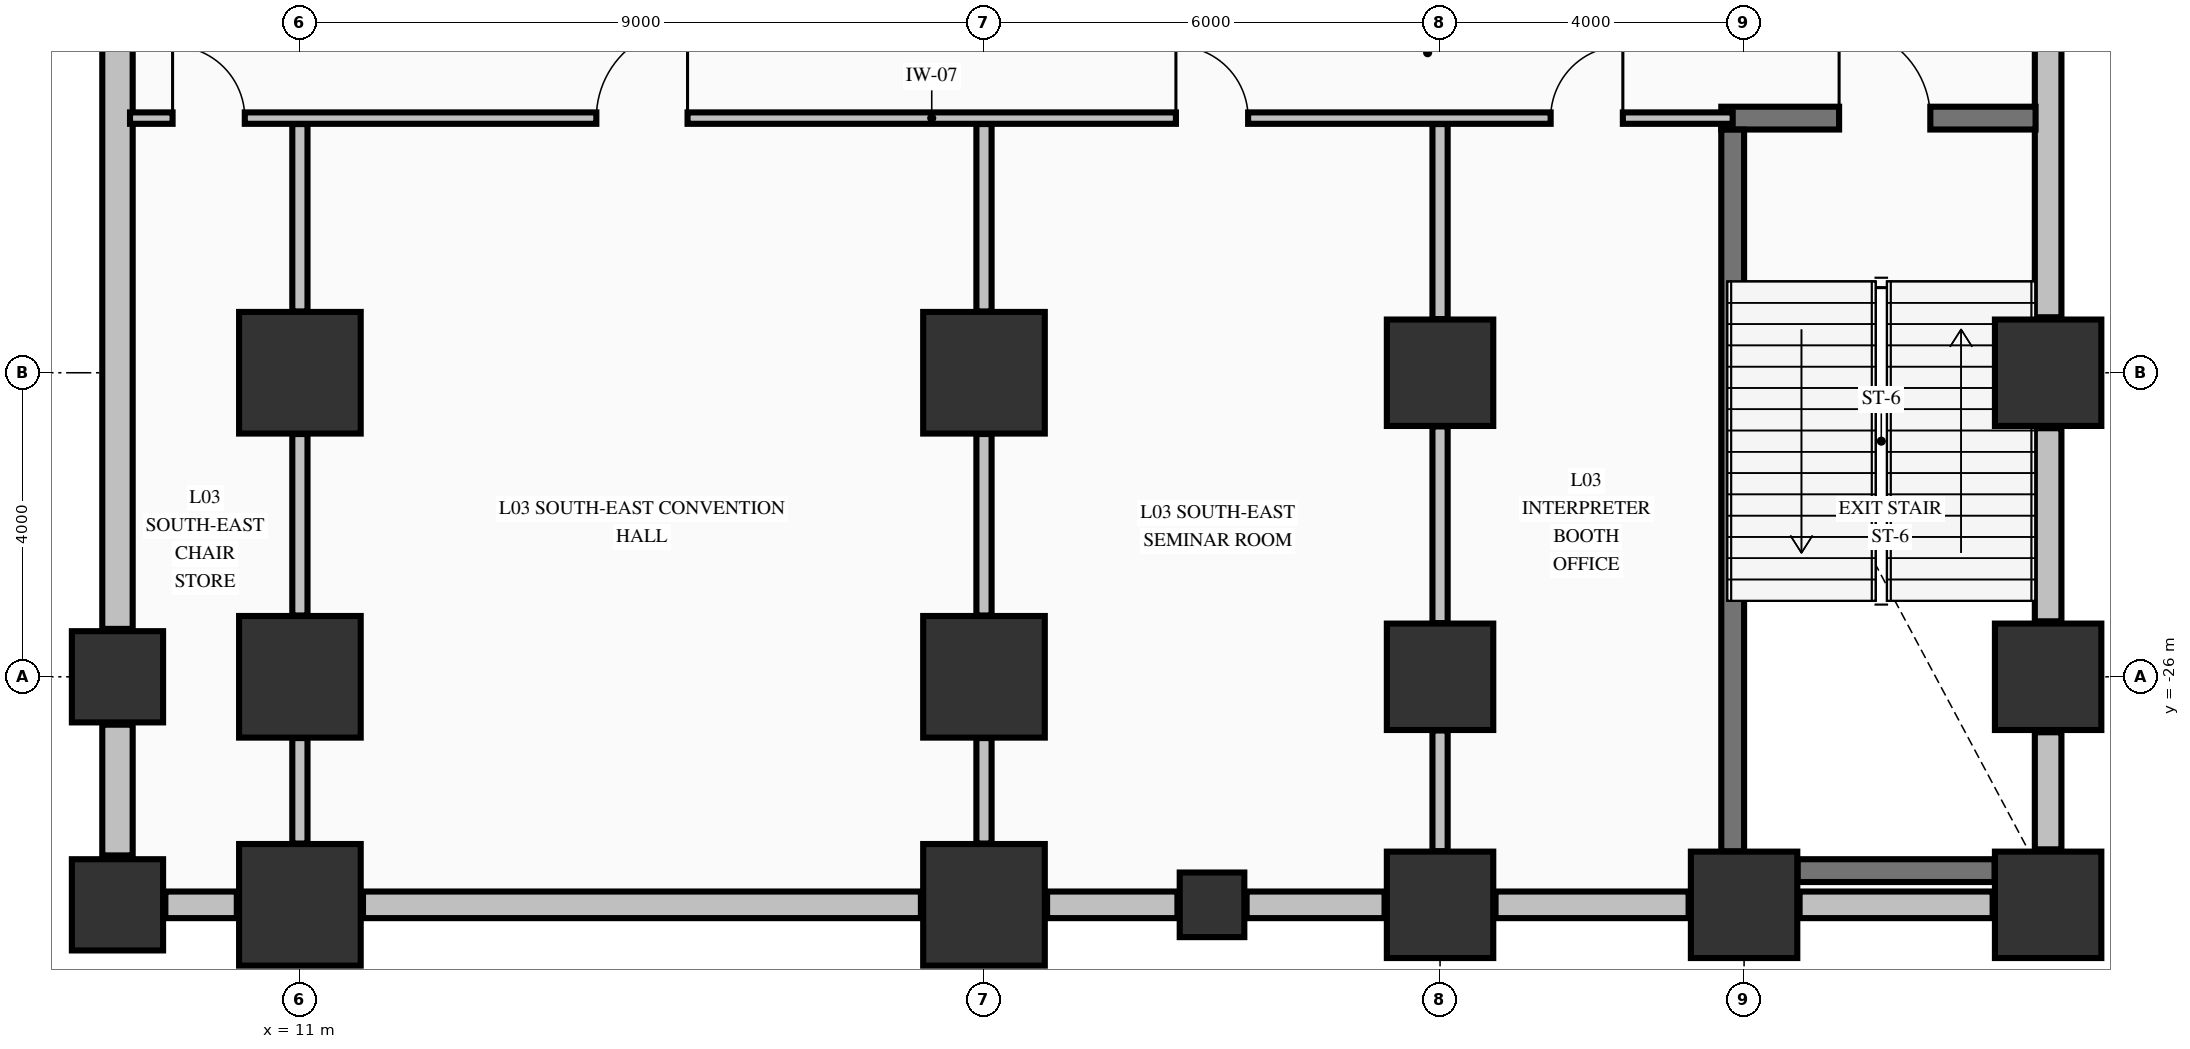
"""IFC4 building model, lengths in metres.
Left out: names, types, materials, properties, quantities, classifications, styles, units other than length and angle.
Written with IfcOpenShell. Run it as: python <this file> out.ifc"""

import sys

from ifc_helpers import new_model, si_unit, direction, frame, frame_2d, origin, origin_2d, place, context, subcontext, project, spatial, rectangle, extrude, element, fill, save


model = new_model("IFC4")
c1 = context("Model", 3, precision=1e-05, world=origin(), true_north=direction((0.0, 1.0)))
c2 = subcontext(c1, "Body", "Model", "MODEL_VIEW")
j1 = project(units=[si_unit("LENGTHUNIT", "METRE"), si_unit("PLANEANGLEUNIT", "RADIAN")], contexts=[c1])
p1 = place(None, origin())
s1 = spatial("IfcSite", under=j1, at=p1, CompositionType="ELEMENT")
p2 = place(p1, origin())
s2 = spatial("IfcBuilding", under=s1, at=p2, CompositionType="ELEMENT")
p3 = place(p2, frame((0.0, 0.0, 16.32)))
s3 = spatial("IfcBuildingStorey", under=s2, at=p3, CompositionType="ELEMENT", Elevation=16.32)
for number, where, z_axis, x_axis in (
    (1, (11.0, -29.0, 0.0), (0.0, 0.0, 1.0), (1.0, 0.0, 0.0)),
    (2, (11.0, -26.0, 0.0), (0.0, 0.0, 1.0), (1.0, 0.0, 0.0)),
    (3, (11.0, -22.0, 0.0), (0.0, 0.0, 1.0), (1.0, 0.0, 0.0)),
    (4, (20.0, -29.0, 0.0), (0.0, 0.0, 1.0), (1.0, 0.0, 0.0)),
    (5, (20.0, -26.0, 0.0), (0.0, 0.0, 1.0), (1.0, 0.0, 0.0)),
    (6, (20.0, -22.0, 0.0), (0.0, 0.0, 1.0), (1.0, 0.0, 0.0)),
):
    element("IfcColumn", number, at=place(p3, frame(where, z_axis=z_axis, x_axis=x_axis)), inside=s3, PredefinedType="COLUMN", context=c2, shape_type="SweptSolid", body=[
        extrude(rectangle(XDim=1.6, YDim=1.6, at=origin_2d()), origin(), (0.0, 0.0, 1.0), 4.99),
    ])
for number, where, z_axis, x_axis in (
    (7, (26.0, -29.0, 0.0), (0.0, 0.0, 1.0), (1.0, 0.0, 0.0)),
    (8, (26.0, -26.0, 0.0), (0.0, 0.0, 1.0), (1.0, 0.0, 0.0)),
    (9, (26.0, -22.0, 0.0), (0.0, 0.0, 1.0), (1.0, 0.0, 0.0)),
    (10, (30.0, -29.0, 0.0), (0.0, 0.0, 1.0), (1.0, 0.0, 0.0)),
    (11, (34.0, -29.0, 0.0), (0.0, 0.0, 1.0), (1.0, 0.0, 0.0)),
    (12, (34.0, -26.0, 0.0), (0.0, 0.0, 1.0), (1.0, 0.0, 0.0)),
    (13, (34.0, -22.0, 0.0), (0.0, 0.0, 1.0), (1.0, 0.0, 0.0)),
):
    element("IfcColumn", number, at=place(p3, frame(where, z_axis=z_axis, x_axis=x_axis)), inside=s3, PredefinedType="COLUMN", context=c2, shape_type="SweptSolid", body=[
        extrude(rectangle(XDim=1.4, YDim=1.4, at=origin_2d()), origin(), (0.0, 0.0, 1.0), 4.99),
    ])
for number, where, z_axis, x_axis in (
    (14, (8.6, -29.0, 0.0), (0.0, 0.0, 1.0), (1.0, 0.0, 0.0)),
    (15, (8.6, -26.0, 0.0), (0.0, 0.0, 1.0), (1.0, 0.0, 0.0)),
):
    element("IfcColumn", number, at=place(p3, frame(where, z_axis=z_axis, x_axis=x_axis)), inside=s3, PredefinedType="COLUMN", context=c2, shape_type="SweptSolid", body=[
        extrude(rectangle(XDim=1.2, YDim=1.2, at=origin_2d()), origin(), (0.0, 0.0, 1.0), 4.99),
    ])
p4 = place(p3, frame((23.0, -29.0, 0.0), z_axis=(0.0, 0.0, 1.0), x_axis=(1.0, 0.0, 0.0)))
e16 = element("IfcColumn", 16, at=p4, inside=s3, PredefinedType="PILASTER", context=c2, shape_type="SweptSolid", body=[
    extrude(rectangle(XDim=0.85, YDim=0.85, at=origin_2d()), origin(), (0.0, 0.0, 1.0), 4.99),
])
p5 = place(p3, frame((9.23, -29.0, 0.0), z_axis=(0.0, 0.0, 1.0), x_axis=(1.0, 0.0, 0.0)))
e17 = element("IfcWall", 17, at=p5, inside=s3, PredefinedType="STANDARD", context=c2, shape_type="SweptSolid", body=[
    extrude(rectangle(XDim=0.94, YDim=0.35, at=frame_2d((0.47, 0.0))), origin(), (0.0, 0.0, 1.0), 3.332),
])
p6 = place(p3, frame((11.83, -29.0, 0.0), z_axis=(0.0, 0.0, 1.0), x_axis=(1.0, 0.0, 0.0)))
e18 = element("IfcWall", 18, at=p6, inside=s3, PredefinedType="STANDARD", context=c2, shape_type="SweptSolid", body=[
    extrude(rectangle(XDim=7.34, YDim=0.35, at=frame_2d((3.67, 0.0))), origin(), (0.0, 0.0, 1.0), 3.332),
])
p7 = place(p3, frame((20.83, -29.0, 0.0), z_axis=(0.0, 0.0, 1.0), x_axis=(1.0, 0.0, 0.0)))
e19 = element("IfcWall", 19, at=p7, inside=s3, PredefinedType="STANDARD", context=c2, shape_type="SweptSolid", body=[
    extrude(rectangle(XDim=1.715, YDim=0.35, at=frame_2d((0.857, 0.0))), origin(), (0.0, 0.0, 1.0), 3.332),
])
p8 = place(p3, frame((23.455, -29.0, 0.0), z_axis=(0.0, 0.0, 1.0), x_axis=(1.0, 0.0, 0.0)))
e20 = element("IfcWall", 20, at=p8, inside=s3, PredefinedType="STANDARD", context=c2, shape_type="SweptSolid", body=[
    extrude(rectangle(XDim=1.815, YDim=0.35, at=frame_2d((0.907, 0.0))), origin(), (0.0, 0.0, 1.0), 3.332),
])
for number, where, z_axis, x_axis in (
    (21, (26.73, -29.0, 0.0), (0.0, 0.0, 1.0), (1.0, 0.0, 0.0)),
    (22, (30.73, -29.0, 0.0), (0.0, 0.0, 1.0), (1.0, 0.0, 0.0)),
):
    element("IfcWall", number, at=place(p3, frame(where, z_axis=z_axis, x_axis=x_axis)), inside=s3, PredefinedType="STANDARD", context=c2, shape_type="SweptSolid", body=[
        extrude(rectangle(XDim=2.54, YDim=0.35, at=frame_2d((1.27, 0.0))), origin(), (0.0, 0.0, 1.0), 3.332),
    ])
p9 = place(p3, frame((34.0, -26.73, 0.0), z_axis=(0.0, 0.0, 1.0), x_axis=(0.0, -1.0, 0.0)))
e23 = element("IfcWall", 23, at=p9, inside=s3, PredefinedType="STANDARD", context=c2, shape_type="SweptSolid", body=[
    extrude(rectangle(XDim=1.54, YDim=0.35, at=frame_2d((0.77, 0.0))), origin(), (0.0, 0.0, 1.0), 4.99),
])
p10 = place(p3, frame((34.0, -22.73, 0.0), z_axis=(0.0, 0.0, 1.0), x_axis=(0.0, -1.0, 0.0)))
e24 = element("IfcWall", 24, at=p10, inside=s3, PredefinedType="STANDARD", context=c2, shape_type="SweptSolid", body=[
    extrude(rectangle(XDim=2.54, YDim=0.35, at=frame_2d((1.27, 0.0))), origin(), (0.0, 0.0, 1.0), 4.99),
])
p11 = place(p3, frame((34.0, -16.73, 0.0), z_axis=(0.0, 0.0, 1.0), x_axis=(0.0, -1.0, 0.0)))
e25 = element("IfcWall", 25, at=p11, inside=s3, PredefinedType="STANDARD", context=c2, shape_type="SweptSolid", body=[
    extrude(rectangle(XDim=4.54, YDim=0.35, at=frame_2d((2.27, 0.0))), origin(), (0.0, 0.0, 1.0), 4.99),
])
p12 = place(p3, frame((8.6, -0.65, 0.0), z_axis=(0.0, 0.0, 1.0), x_axis=(0.0, -1.0, 0.0)))
e26 = element("IfcWall", 26, at=p12, inside=s3, PredefinedType="STANDARD", context=c2, shape_type="SweptSolid", body=[
    extrude(rectangle(XDim=24.72, YDim=0.4, at=frame_2d((12.36, 0.0))), origin(), (0.0, 0.0, 1.0), 2.582),
])
p13 = place(p3, frame((8.6, -26.63, 0.0), z_axis=(0.0, 0.0, 1.0), x_axis=(0.0, -1.0, 0.0)))
e27 = element("IfcWall", 27, at=p13, inside=s3, PredefinedType="STANDARD", context=c2, shape_type="SweptSolid", body=[
    extrude(rectangle(XDim=1.72, YDim=0.4, at=frame_2d((0.86, 0.0))), origin(), (0.0, 0.0, 1.0), 3.332),
])
p14 = place(p3, frame((30.704, -28.55, 0.0), z_axis=(0.0, 0.0, 1.0), x_axis=(1.0, 0.0, 0.0)))
e28 = element("IfcWall", 28, at=p14, inside=s3, PredefinedType="SHEAR", context=c2, shape_type="SweptSolid", body=[
    extrude(rectangle(XDim=2.592, YDim=0.3, at=frame_2d((1.296, 0.0))), origin(), (0.0, 0.0, 1.0), 4.99),
])
p15 = place(p3, frame((29.7, -18.65, 0.0), z_axis=(0.0, 0.0, 1.0), x_axis=(1.0, 0.0, 0.0)))
e29 = element("IfcWall", 29, at=p15, inside=s3, PredefinedType="SHEAR", context=c2, shape_type="SweptSolid", body=[
    extrude(rectangle(XDim=4.135, YDim=0.3, at=frame_2d((2.067, 0.0))), origin(), (0.0, 0.0, 1.0), 4.99),
])
p16 = place(p15, frame((1.55, 0.0, 0.0)))
e30 = element("IfcOpeningElement", 30, at=p16, cuts=e29, PredefinedType="OPENING", context=c2, shape_type="SweptSolid", body=[
    extrude(rectangle(XDim=1.2, YDim=2.15, at=frame_2d((0.6, 1.075))), frame((0.0, 0.16, 0.0), z_axis=(0.0, -1.0, 0.0), x_axis=(1.0, 0.0, 0.0)), (0.0, 0.0, 1.0), 0.32),
])
p17 = place(p3, frame((8.765, -18.65, 0.0), z_axis=(0.0, 0.0, 1.0), x_axis=(1.0, 0.0, 0.0)))
e31 = element("IfcWall", 31, at=p17, inside=s3, PredefinedType="PARTITIONING", context=c2, shape_type="SweptSolid", body=[
    extrude(rectangle(XDim=21.085, YDim=0.15, at=frame_2d((10.542, 0.0))), origin(), (0.0, 0.0, 1.0), 4.99),
])
p18 = place(p17, frame((0.56, 0.0, 0.0)))
e32 = element("IfcOpeningElement", 32, at=p18, cuts=e31, PredefinedType="OPENING", context=c2, shape_type="SweptSolid", body=[
    extrude(rectangle(XDim=0.95, YDim=2.15, at=frame_2d((0.475, 1.075))), frame((0.0, 0.085, 0.0), z_axis=(0.0, -1.0, 0.0), x_axis=(1.0, 0.0, 0.0)), (0.0, 0.0, 1.0), 0.17),
])
p19 = place(p17, frame((6.135, 0.0, 0.0)))
e33 = element("IfcOpeningElement", 33, at=p19, cuts=e31, PredefinedType="OPENING", context=c2, shape_type="SweptSolid", body=[
    extrude(rectangle(XDim=1.2, YDim=2.15, at=frame_2d((0.6, 1.075))), frame((0.0, 0.085, 0.0), z_axis=(0.0, -1.0, 0.0), x_axis=(1.0, 0.0, 0.0)), (0.0, 0.0, 1.0), 0.17),
])
p20 = place(p17, frame((13.76, 0.0, 0.0)))
e34 = element("IfcOpeningElement", 34, at=p20, cuts=e31, PredefinedType="OPENING", context=c2, shape_type="SweptSolid", body=[
    extrude(rectangle(XDim=0.95, YDim=2.15, at=frame_2d((0.475, 1.075))), frame((0.0, 0.085, 0.0), z_axis=(0.0, -1.0, 0.0), x_axis=(1.0, 0.0, 0.0)), (0.0, 0.0, 1.0), 0.17),
])
p21 = place(p17, frame((18.69, 0.0, 0.0)))
e35 = element("IfcOpeningElement", 35, at=p21, cuts=e31, PredefinedType="OPENING", context=c2, shape_type="SweptSolid", body=[
    extrude(rectangle(XDim=0.95, YDim=2.15, at=frame_2d((0.475, 1.075))), frame((0.0, 0.085, 0.0), z_axis=(0.0, -1.0, 0.0), x_axis=(1.0, 0.0, 0.0)), (0.0, 0.0, 1.0), 0.17),
])
p22 = place(p3, frame((29.85, -28.296, 0.0), z_axis=(0.0, 0.0, 1.0), x_axis=(0.0, 1.0, 0.0)))
e36 = element("IfcWall", 36, at=p22, inside=s3, PredefinedType="SHEAR", context=c2, shape_type="SweptSolid", body=[
    extrude(rectangle(XDim=9.494, YDim=0.3, at=frame_2d((4.747, 0.0))), origin(), (0.0, 0.0, 1.0), 4.99),
])
p23 = place(p3, frame((11.0, -28.194, 0.0), z_axis=(0.0, 0.0, 1.0), x_axis=(0.0, 1.0, 0.0)))
e37 = element("IfcWall", 37, at=p23, inside=s3, PredefinedType="PARTITIONING", context=c2, shape_type="SweptSolid", body=[
    extrude(rectangle(XDim=1.388, YDim=0.2, at=frame_2d((0.694, 0.0))), origin(), (0.0, 0.0, 1.0), 3.332),
])
p24 = place(p3, frame((11.0, -25.194, 0.0), z_axis=(0.0, 0.0, 1.0), x_axis=(0.0, 1.0, 0.0)))
e38 = element("IfcWall", 38, at=p24, inside=s3, PredefinedType="PARTITIONING", context=c2, shape_type="SweptSolid", body=[
    extrude(rectangle(XDim=2.388, YDim=0.2, at=frame_2d((1.194, 0.0))), origin(), (0.0, 0.0, 1.0), 3.332),
])
p25 = place(p3, frame((11.0, -21.194, 0.0), z_axis=(0.0, 0.0, 1.0), x_axis=(0.0, 1.0, 0.0)))
e39 = element("IfcWall", 39, at=p25, inside=s3, PredefinedType="PARTITIONING", context=c2, shape_type="SweptSolid", body=[
    extrude(rectangle(XDim=2.466, YDim=0.2, at=frame_2d((1.233, 0.0))), origin(), (0.0, 0.0, 1.0), 3.332),
])
p26 = place(p3, frame((20.0, -28.194, 0.0), z_axis=(0.0, 0.0, 1.0), x_axis=(0.0, 1.0, 0.0)))
e40 = element("IfcWall", 40, at=p26, inside=s3, PredefinedType="PARTITIONING", context=c2, shape_type="SweptSolid", body=[
    extrude(rectangle(XDim=1.388, YDim=0.2, at=frame_2d((0.694, 0.0))), origin(), (0.0, 0.0, 1.0), 3.332),
])
p27 = place(p3, frame((20.0, -25.194, 0.0), z_axis=(0.0, 0.0, 1.0), x_axis=(0.0, 1.0, 0.0)))
e41 = element("IfcWall", 41, at=p27, inside=s3, PredefinedType="PARTITIONING", context=c2, shape_type="SweptSolid", body=[
    extrude(rectangle(XDim=2.388, YDim=0.2, at=frame_2d((1.194, 0.0))), origin(), (0.0, 0.0, 1.0), 3.332),
])
p28 = place(p3, frame((20.0, -21.194, 0.0), z_axis=(0.0, 0.0, 1.0), x_axis=(0.0, 1.0, 0.0)))
e42 = element("IfcWall", 42, at=p28, inside=s3, PredefinedType="PARTITIONING", context=c2, shape_type="SweptSolid", body=[
    extrude(rectangle(XDim=2.466, YDim=0.2, at=frame_2d((1.233, 0.0))), origin(), (0.0, 0.0, 1.0), 3.332),
])
p29 = place(p3, frame((26.0, -28.294, 0.0), z_axis=(0.0, 0.0, 1.0), x_axis=(0.0, 1.0, 0.0)))
e43 = element("IfcWall", 43, at=p29, inside=s3, PredefinedType="PARTITIONING", context=c2, shape_type="SweptSolid", body=[
    extrude(rectangle(XDim=1.588, YDim=0.2, at=frame_2d((0.794, 0.0))), origin(), (0.0, 0.0, 1.0), 3.332),
])
p30 = place(p3, frame((26.0, -25.294, 0.0), z_axis=(0.0, 0.0, 1.0), x_axis=(0.0, 1.0, 0.0)))
e44 = element("IfcWall", 44, at=p30, inside=s3, PredefinedType="PARTITIONING", context=c2, shape_type="SweptSolid", body=[
    extrude(rectangle(XDim=2.588, YDim=0.2, at=frame_2d((1.294, 0.0))), origin(), (0.0, 0.0, 1.0), 3.332),
])
p31 = place(p3, frame((26.0, -21.294, 0.0), z_axis=(0.0, 0.0, 1.0), x_axis=(0.0, 1.0, 0.0)))
e45 = element("IfcWall", 45, at=p31, inside=s3, PredefinedType="PARTITIONING", context=c2, shape_type="SweptSolid", body=[
    extrude(rectangle(XDim=2.566, YDim=0.2, at=frame_2d((1.283, 0.0))), origin(), (0.0, 0.0, 1.0), 3.332),
])
p32 = place(p16, origin())
e46 = element("IfcDoor", 46, at=p32, inside=s3, OperationType="SINGLE_SWING_LEFT", PredefinedType="DOOR", context=c2, shape_type="SweptSolid", body=[
    extrude(rectangle(XDim=1.2, YDim=2.15, at=frame_2d((0.6, 1.075))), frame((0.0, 0.025, 0.0), z_axis=(0.0, -1.0, 0.0), x_axis=(1.0, 0.0, 0.0)), (0.0, 0.0, 1.0), 0.05),
])
fill(e30, e46)
p33 = place(p18, origin())
e47 = element("IfcDoor", 47, at=p33, inside=s3, OperationType="SINGLE_SWING_LEFT", PredefinedType="DOOR", context=c2, shape_type="SweptSolid", body=[
    extrude(rectangle(XDim=0.95, YDim=2.15, at=frame_2d((0.475, 1.075))), frame((0.0, 0.025, 0.0), z_axis=(0.0, -1.0, 0.0), x_axis=(1.0, 0.0, 0.0)), (0.0, 0.0, 1.0), 0.05),
])
fill(e32, e47)
p34 = place(p19, origin())
e48 = element("IfcDoor", 48, at=p34, inside=s3, OperationType="SINGLE_SWING_RIGHT", PredefinedType="DOOR", context=c2, shape_type="SweptSolid", body=[
    extrude(rectangle(XDim=1.2, YDim=2.15, at=frame_2d((0.6, 1.075))), frame((0.0, 0.025, 0.0), z_axis=(0.0, -1.0, 0.0), x_axis=(1.0, 0.0, 0.0)), (0.0, 0.0, 1.0), 0.05),
])
fill(e33, e48)
p35 = place(p20, origin())
e49 = element("IfcDoor", 49, at=p35, inside=s3, OperationType="SINGLE_SWING_LEFT", PredefinedType="DOOR", context=c2, shape_type="SweptSolid", body=[
    extrude(rectangle(XDim=0.95, YDim=2.15, at=frame_2d((0.475, 1.075))), frame((0.0, 0.025, 0.0), z_axis=(0.0, -1.0, 0.0), x_axis=(1.0, 0.0, 0.0)), (0.0, 0.0, 1.0), 0.05),
])
fill(e34, e49)
p36 = place(p21, origin())
e50 = element("IfcDoor", 50, at=p36, inside=s3, OperationType="SINGLE_SWING_RIGHT", PredefinedType="DOOR", context=c2, shape_type="SweptSolid", body=[
    extrude(rectangle(XDim=0.95, YDim=2.15, at=frame_2d((0.475, 1.075))), frame((0.0, 0.025, 0.0), z_axis=(0.0, -1.0, 0.0), x_axis=(1.0, 0.0, 0.0)), (0.0, 0.0, 1.0), 0.05),
])
fill(e35, e50)
save(model, sys.argv[1])
